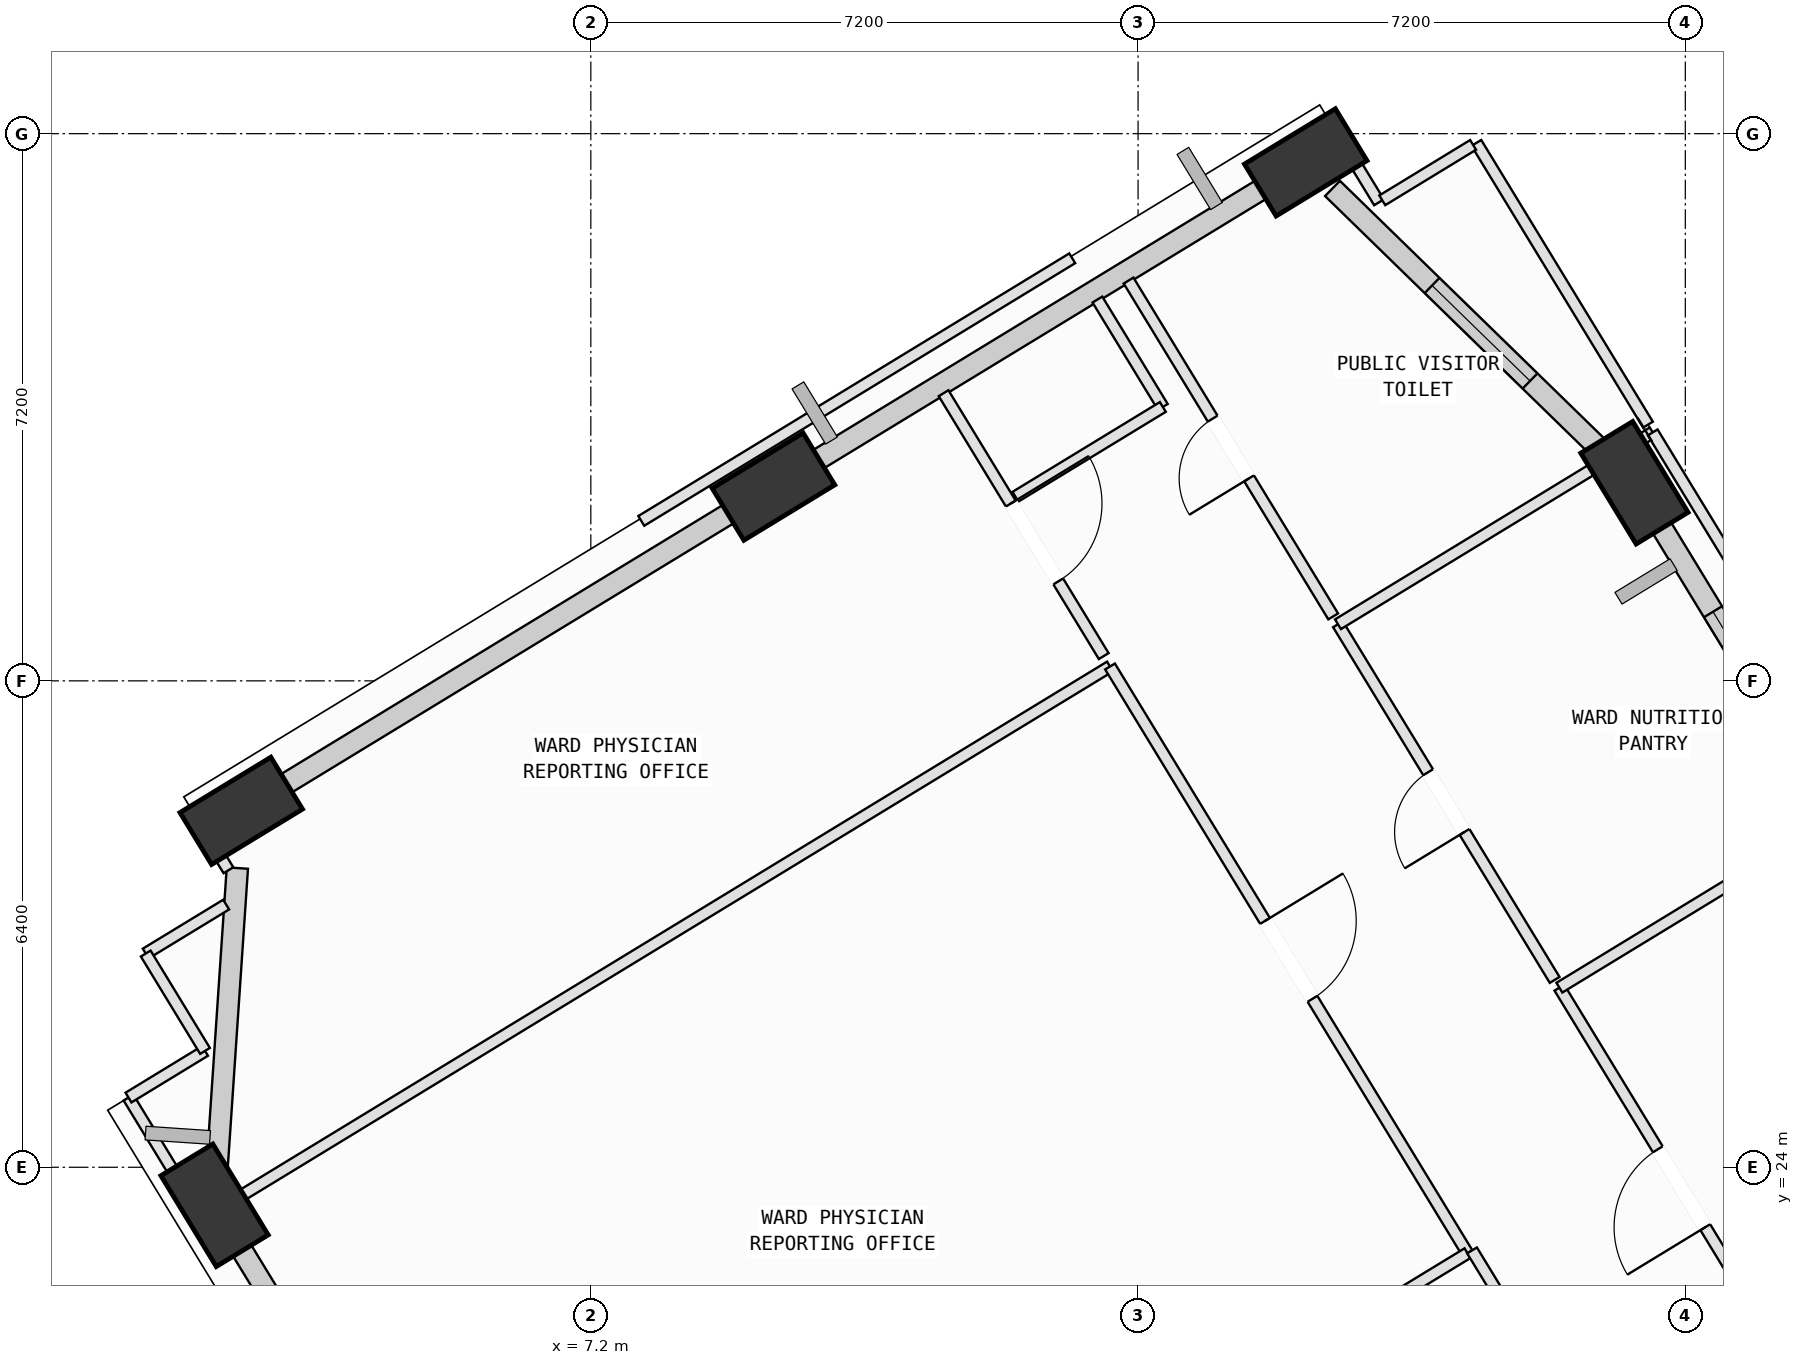
"""IFC4 building model, lengths in metres.
Left out: names, types, materials, properties, quantities, classifications, styles, units other than length and angle.
Written with IfcOpenShell. Run it as: python <this file> out.ifc"""

import sys

from ifc_helpers import new_model, si_unit, direction, frame, frame_2d, origin, origin_2d, place, context, subcontext, project, spatial, rectangle, extrude, element, fill, save


model = new_model("IFC4")
c1 = context("Model", 3, precision=1e-05, world=origin(), true_north=direction((0.0, 1.0)))
c2 = subcontext(c1, "Body", "Model", "MODEL_VIEW")
j1 = project(units=[si_unit("LENGTHUNIT", "METRE"), si_unit("PLANEANGLEUNIT", "RADIAN")], contexts=[c1])
p1 = place(None, origin())
s1 = spatial("IfcSite", under=j1, at=p1, CompositionType="ELEMENT")
p2 = place(p1, origin())
s2 = spatial("IfcBuilding", under=s1, at=p2, CompositionType="ELEMENT")
p3 = place(p2, frame((0.0, 0.0, 157.8)))
s3 = spatial("IfcBuildingStorey", under=s2, at=p3, CompositionType="ELEMENT", Elevation=157.8)
p4 = place(p3, frame((20.931, 33.007, 0.002), z_axis=(-0.033534518386, -0.052679679792, 0.998048239021), x_axis=(0.018821904997, 0.998399508653, 0.053330638599)))
e1 = element("IfcColumn", 1, at=p4, inside=s3, PredefinedType="COLUMN", context=c2, shape_type="SweptSolid", body=[
    extrude(rectangle(XDim=1.4, YDim=0.8, at=origin_2d()), origin(), (0.0, 0.0, 1.0), 4.004),
])
p5 = place(p3, frame((16.606, 37.222, 0.002), z_axis=(-0.050696300595, -0.070597489424, 0.996215779635), x_axis=(0.995994383775, -0.077139317249, 0.045218505326)))
e2 = element("IfcColumn", 2, at=p5, inside=s3, PredefinedType="COLUMN", context=c2, shape_type="SweptSolid", body=[
    extrude(rectangle(XDim=1.4, YDim=0.8, at=origin_2d()), origin(), (0.0, 0.0, 1.0), 4.011),
])
p6 = place(p3, frame((9.603, 32.956, 0.002), z_axis=(-0.032808767098, -0.099155385009, 0.994530941914), x_axis=(0.973312929666, 0.222955959714, 0.054337657051)))
e3 = element("IfcColumn", 3, at=p6, inside=s3, PredefinedType="COLUMN", context=c2, shape_type="SweptSolid", body=[
    extrude(rectangle(XDim=1.4, YDim=0.8, at=origin_2d()), origin(), (0.0, 0.0, 1.0), 4.018),
])
p7 = place(p3, frame((2.6, 28.69, 0.002), z_axis=(-0.014904008756, -0.127532270045, 0.99172243628), x_axis=(0.908122138769, 0.413342067072, 0.066802070824)))
e4 = element("IfcColumn", 4, at=p7, inside=s3, PredefinedType="COLUMN", context=c2, shape_type="SweptSolid", body=[
    extrude(rectangle(XDim=1.4, YDim=0.8, at=origin_2d()), origin(), (0.0, 0.0, 1.0), 4.03),
])
p8 = place(p3, frame((2.25, 23.499, 0.002), z_axis=(0.006421586206, -0.128795210131, 0.991650420803), x_axis=(-0.561790948071, 0.819916255425, 0.110128401217)))
e5 = element("IfcColumn", 5, at=p8, inside=s3, PredefinedType="COLUMN", context=c2, shape_type="SweptSolid", body=[
    extrude(rectangle(XDim=1.4, YDim=0.8, at=origin_2d()), origin(), (0.0, 0.0, 1.0), 4.03),
])
p9 = place(p3, frame((24.448, 27.232, 0.0), z_axis=(0.0, 0.0, 1.0), x_axis=(-0.520230695159, 0.854025774678, 0.0)))
e6 = element("IfcWall", 6, at=p9, inside=s3, PredefinedType="SOLIDWALL", context=c2, shape_type="SweptSolid", body=[
    extrude(rectangle(XDim=6.223, YDim=0.28, at=frame_2d((3.111, 0.0))), origin(), (0.0, 0.0, 1.0), 3.165),
])
p10 = place(p9, frame((3.374, 0.0, 0.75)))
e7 = element("IfcOpeningElement", 7, at=p10, cuts=e6, PredefinedType="OPENING", context=c2, shape_type="SweptSolid", body=[
    extrude(rectangle(XDim=1.4, YDim=1.85, at=frame_2d((0.7, 0.925))), frame((0.0, 0.15, 0.0), z_axis=(0.0, -1.0, 0.0), x_axis=(1.0, 0.0, 0.0)), (0.0, 0.0, 1.0), 0.3),
])
p11 = place(p3, frame((16.958, 36.879, 0.0), z_axis=(0.0, 0.0, 1.0), x_axis=(0.716061838251, -0.698036849888, 0.0)))
e8 = element("IfcWall", 8, at=p11, inside=s3, PredefinedType="SOLIDWALL", context=c2, shape_type="SweptSolid", body=[
    extrude(rectangle(XDim=5.093, YDim=0.28, at=frame_2d((2.546, 0.0))), origin(), (0.0, 0.0, 1.0), 3.165),
])
p12 = place(p11, frame((1.83, 0.0, 0.75)))
e9 = element("IfcOpeningElement", 9, at=p12, cuts=e8, PredefinedType="OPENING", context=c2, shape_type="SweptSolid", body=[
    extrude(rectangle(XDim=1.8, YDim=2.05, at=frame_2d((0.9, 1.025))), frame((0.0, 0.15, 0.0), z_axis=(0.0, -1.0, 0.0), x_axis=(1.0, 0.0, 0.0)), (0.0, 0.0, 1.0), 0.3),
])
p13 = place(p3, frame((9.874, 33.121, 0.0), z_axis=(0.0, 0.0, 1.0), x_axis=(0.854014635071, 0.52024898182, 0.0)))
e10 = element("IfcWall", 10, at=p13, inside=s3, PredefinedType="SOLIDWALL", context=c2, shape_type="SweptSolid", body=[
    extrude(rectangle(XDim=7.231, YDim=0.28, at=frame_2d((3.615, 0.0))), origin(), (0.0, 0.0, 1.0), 3.165),
])
p14 = place(p3, frame((2.851, 28.842, 0.0), z_axis=(0.0, 0.0, 1.0), x_axis=(0.854006543664, 0.520262264036, 0.0)))
e11 = element("IfcWall", 11, at=p14, inside=s3, PredefinedType="SOLIDWALL", context=c2, shape_type="SweptSolid", body=[
    extrude(rectangle(XDim=7.27, YDim=0.28, at=frame_2d((3.635, 0.0))), origin(), (0.0, 0.0, 1.0), 3.165),
])
p15 = place(p3, frame((2.265, 23.736, 0.0), z_axis=(0.0, 0.0, 1.0), x_axis=(0.067492637581, 0.997719772217, 0.0)))
e12 = element("IfcWall", 12, at=p15, inside=s3, PredefinedType="SOLIDWALL", context=c2, shape_type="SweptSolid", body=[
    extrude(rectangle(XDim=4.21, YDim=0.28, at=frame_2d((2.105, 0.0))), origin(), (0.0, 0.0, 1.0), 3.165),
])
p16 = place(p3, frame((5.546, 18.088, 0.0), z_axis=(0.0, 0.0, 1.0), x_axis=(-0.5202703237, 0.85400163365, 0.0)))
e13 = element("IfcWall", 13, at=p16, inside=s3, PredefinedType="SOLIDWALL", context=c2, shape_type="SweptSolid", body=[
    extrude(rectangle(XDim=5.628, YDim=0.28, at=frame_2d((2.814, 0.0))), origin(), (0.0, 0.0, 1.0), 3.165),
])
p17 = place(p16, frame((2.111, 0.0, 0.75)))
e14 = element("IfcOpeningElement", 14, at=p17, cuts=e13, PredefinedType="OPENING", context=c2, shape_type="SweptSolid", body=[
    extrude(rectangle(XDim=1.4, YDim=1.85, at=frame_2d((0.7, 0.925))), frame((0.0, 0.15, 0.0), z_axis=(0.0, -1.0, 0.0), x_axis=(1.0, 0.0, 0.0)), (0.0, 0.0, 1.0), 0.3),
])
p18 = place(p3, frame((2.092, 23.316, 0.0), z_axis=(0.0, 0.0, 1.0), x_axis=(0.854007963695, 0.520259933059, 0.0)))
e15 = element("IfcWall", 15, at=p18, inside=s3, PredefinedType="PARTITIONING", context=c2, shape_type="SweptSolid", body=[
    extrude(rectangle(XDim=13.98, YDim=0.15, at=frame_2d((6.99, 0.0))), origin(), (0.0, 0.0, 1.0), 3.78),
])
p19 = place(p3, frame((14.031, 30.589, 0.0), z_axis=(0.0, 0.0, 1.0), x_axis=(0.520239078164, -0.854020668105, 0.0)))
e16 = element("IfcWall", 16, at=p19, inside=s3, PredefinedType="PARTITIONING", context=c2, shape_type="SweptSolid", body=[
    extrude(rectangle(XDim=9.04, YDim=0.15, at=frame_2d((4.52, 0.0))), origin(), (0.0, 0.0, 1.0), 3.78),
])
p20 = place(p19, frame((3.92, 0.0, 0.0)))
e17 = element("IfcOpeningElement", 17, at=p20, cuts=e16, PredefinedType="OPENING", context=c2, shape_type="SweptSolid", body=[
    extrude(rectangle(XDim=1.2, YDim=2.15, at=frame_2d((0.6, 1.075))), frame((0.0, 0.085, 0.0), z_axis=(0.0, -1.0, 0.0), x_axis=(1.0, 0.0, 0.0)), (0.0, 0.0, 1.0), 0.17),
])
p21 = place(p3, frame((18.734, 22.869, 0.0), z_axis=(0.0, 0.0, 1.0), x_axis=(-0.854021673807, -0.520237427208, 0.0)))
e18 = element("IfcWall", 18, at=p21, inside=s3, PredefinedType="PARTITIONING", context=c2, shape_type="SweptSolid", body=[
    extrude(rectangle(XDim=4.506, YDim=0.15, at=frame_2d((2.253, 0.0))), origin(), (0.0, 0.0, 1.0), 3.78),
])
p22 = place(p3, frame((2.422, 22.774, 0.0), z_axis=(0.0, 0.0, 1.0), x_axis=(-0.520142212164, 0.854079667903, 0.0)))
e19 = element("IfcWall", 19, at=p22, inside=s3, PredefinedType="PARTITIONING", context=c2, shape_type="SweptSolid", body=[
    extrude(rectangle(XDim=0.635, YDim=0.15, at=frame_2d((0.317, 0.0))), origin(), (0.0, 0.0, 1.0), 3.165),
])
p23 = place(p3, frame((1.344, 26.812, 0.0), z_axis=(0.0, 0.0, 1.0), x_axis=(0.854206167436, 0.519934441554, 0.0)))
e20 = element("IfcWall", 20, at=p23, inside=s3, PredefinedType="PARTITIONING", context=c2, shape_type="SweptSolid", body=[
    extrude(rectangle(XDim=1.239, YDim=0.15, at=frame_2d((0.619, 0.0))), origin(), (0.0, 0.0, 1.0), 3.78),
])
p24 = place(p3, frame((2.432, 27.908, 0.0), z_axis=(0.0, 0.0, 1.0), x_axis=(-0.519606283124, 0.854405823095, 0.0)))
e21 = element("IfcWall", 21, at=p24, inside=s3, PredefinedType="PARTITIONING", context=c2, shape_type="SweptSolid", body=[
    extrude(rectangle(XDim=0.75, YDim=0.15, at=frame_2d((0.375, 0.0))), origin(), (0.0, 0.0, 1.0), 3.065),
])
p25 = place(p3, frame((2.042, 28.549, 0.0), z_axis=(0.0, 0.0, 1.0), x_axis=(0.853818147022, 0.520571389741, 0.0)))
e22 = element("IfcWall", 22, at=p25, inside=s3, PredefinedType="PARTITIONING", context=c2, shape_type="SweptSolid", body=[
    extrude(rectangle(XDim=0.843, YDim=0.15, at=frame_2d((0.422, 0.0))), origin(), (0.0, 0.0, 1.0), 3.78),
])
p26 = place(p3, frame((8.971, 32.77, 0.0), z_axis=(0.0, 0.0, 1.0), x_axis=(0.854178789285, 0.519979418762, 0.0)))
e23 = element("IfcWall", 23, at=p26, inside=s3, PredefinedType="PARTITIONING", context=c2, shape_type="SweptSolid", body=[
    extrude(rectangle(XDim=0.954, YDim=0.15, at=frame_2d((0.477, 0.0))), origin(), (0.0, 0.0, 1.0), 3.78),
])
p27 = place(p3, frame((11.841, 34.185, 0.0), z_axis=(0.0, 0.0, 1.0), x_axis=(0.520210820935, -0.854037880765, 0.0)))
e24 = element("IfcWall", 24, at=p27, inside=s3, PredefinedType="PARTITIONING", context=c2, shape_type="SweptSolid", body=[
    extrude(rectangle(XDim=4.05, YDim=0.15, at=frame_2d((2.025, 0.0))), origin(), (0.0, 0.0, 1.0), 3.78),
])
p28 = place(p27, frame((1.7, 0.0, 0.0)))
e25 = element("IfcOpeningElement", 25, at=p28, cuts=e24, PredefinedType="OPENING", context=c2, shape_type="SweptSolid", body=[
    extrude(rectangle(XDim=1.2, YDim=2.15, at=frame_2d((0.6, 1.075))), frame((0.0, 0.085, 0.0), z_axis=(0.0, -1.0, 0.0), x_axis=(1.0, 0.0, 0.0)), (0.0, 0.0, 1.0), 0.17),
])
p29 = place(p3, frame((2.009, 23.453, 0.0), z_axis=(0.0, 0.0, 1.0), x_axis=(-0.520326364679, 0.853967490142, 0.0)))
e26 = element("IfcWall", 26, at=p29, inside=s3, PredefinedType="PARTITIONING", context=c2, shape_type="SweptSolid", body=[
    extrude(rectangle(XDim=1.715, YDim=0.15, at=frame_2d((0.857, 0.0))), origin(), (0.0, 0.0, 1.0), 3.78),
])
p30 = place(p3, frame((1.117, 24.917, 0.0), z_axis=(0.0, 0.0, 1.0), x_axis=(0.853818614976, 0.520570622222, 0.0)))
e27 = element("IfcWall", 27, at=p30, inside=s3, PredefinedType="PARTITIONING", context=c2, shape_type="SweptSolid", body=[
    extrude(rectangle(XDim=1.179, YDim=0.15, at=frame_2d((0.59, 0.0))), origin(), (0.0, 0.0, 1.0), 3.78),
])
p31 = place(p3, frame((2.124, 25.531, 0.0), z_axis=(0.0, 0.0, 1.0), x_axis=(-0.520086370604, 0.854113673414, 0.0)))
e28 = element("IfcWall", 28, at=p31, inside=s3, PredefinedType="PARTITIONING", context=c2, shape_type="SweptSolid", body=[
    extrude(rectangle(XDim=1.5, YDim=0.15, at=frame_2d((0.75, 0.0))), origin(), (0.0, 0.0, 1.0), 3.78),
])
p32 = place(p3, frame((23.158, 21.085, 0.0), z_axis=(0.0, 0.0, 1.0), x_axis=(-0.520195067616, 0.854047476214, 0.0)))
e29 = element("IfcWall", 29, at=p32, inside=s3, PredefinedType="PARTITIONING", context=c2, shape_type="SweptSolid", body=[
    extrude(rectangle(XDim=6.18, YDim=0.15, at=frame_2d((3.09, 0.0))), origin(), (0.0, 0.0, 1.0), 3.78),
])
p33 = place(p32, frame((2.49, 0.0, 0.0)))
e30 = element("IfcOpeningElement", 30, at=p33, cuts=e29, PredefinedType="OPENING", context=c2, shape_type="SweptSolid", body=[
    extrude(rectangle(XDim=1.2, YDim=2.15, at=frame_2d((0.6, 1.075))), frame((0.0, 0.085, 0.0), z_axis=(0.0, -1.0, 0.0), x_axis=(1.0, 0.0, 0.0)), (0.0, 0.0, 1.0), 0.17),
])
p34 = place(p3, frame((19.943, 26.363, 0.0), z_axis=(0.0, 0.0, 1.0), x_axis=(0.854035162243, 0.520215283948, 0.0)))
e31 = element("IfcWall", 31, at=p34, inside=s3, PredefinedType="PARTITIONING", context=c2, shape_type="SweptSolid", body=[
    extrude(rectangle(XDim=4.185, YDim=0.15, at=frame_2d((2.092, 0.0))), origin(), (0.0, 0.0, 1.0), 3.78),
])
p35 = place(p3, frame((19.881, 26.465, 0.0), z_axis=(0.0, 0.0, 1.0), x_axis=(-0.520269153485, 0.854002346561, 0.0)))
e32 = element("IfcWall", 32, at=p35, inside=s3, PredefinedType="PARTITIONING", context=c2, shape_type="SweptSolid", body=[
    extrude(rectangle(XDim=5.48, YDim=0.15, at=frame_2d((2.74, 0.0))), origin(), (0.0, 0.0, 1.0), 3.78),
])
p36 = place(p35, frame((2.28, 0.0, 0.0)))
e33 = element("IfcOpeningElement", 33, at=p36, cuts=e32, PredefinedType="OPENING", context=c2, shape_type="SweptSolid", body=[
    extrude(rectangle(XDim=0.92, YDim=2.1, at=frame_2d((0.46, 1.05))), frame((0.0, 0.085, 0.0), z_axis=(0.0, -1.0, 0.0), x_axis=(1.0, 0.0, 0.0)), (0.0, 0.0, 1.0), 0.17),
])
p37 = place(p3, frame((17.03, 31.145, 0.0), z_axis=(0.0, 0.0, 1.0), x_axis=(0.853935379197, 0.520379061988, 0.0)))
e34 = element("IfcWall", 34, at=p37, inside=s3, PredefinedType="PARTITIONING", context=c2, shape_type="SweptSolid", body=[
    extrude(rectangle(XDim=4.068, YDim=0.15, at=frame_2d((2.034, 0.0))), origin(), (0.0, 0.0, 1.0), 3.78),
])
p38 = place(p3, frame((20.703, 33.384, 0.0), z_axis=(0.0, 0.0, 1.0), x_axis=(0.854172741776, 0.519989352975, 0.0)))
e35 = element("IfcWall", 35, at=p38, inside=s3, PredefinedType="PARTITIONING", context=c2, shape_type="SweptSolid", body=[
    extrude(rectangle(XDim=0.548, YDim=0.15, at=frame_2d((0.274, 0.0))), origin(), (0.0, 0.0, 1.0), 3.78),
])
p39 = place(p3, frame((21.171, 33.669, 0.0), z_axis=(0.0, 0.0, 1.0), x_axis=(0.520399103796, -0.853923165611, 0.0)))
e36 = element("IfcWall", 36, at=p39, inside=s3, PredefinedType="PARTITIONING", context=c2, shape_type="SweptSolid", body=[
    extrude(rectangle(XDim=5.48, YDim=0.15, at=frame_2d((2.74, 0.0))), origin(), (0.0, 0.0, 1.0), 3.78),
])
p40 = place(p3, frame((18.851, 37.478, 0.0), z_axis=(0.0, 0.0, 1.0), x_axis=(0.52017533127, -0.854059497189, 0.0)))
e37 = element("IfcWall", 37, at=p40, inside=s3, PredefinedType="PARTITIONING", context=c2, shape_type="SweptSolid", body=[
    extrude(rectangle(XDim=4.341, YDim=0.15, at=frame_2d((2.17, 0.0))), origin(), (0.0, 0.0, 1.0), 3.78),
])
p41 = place(p3, frame((16.967, 31.248, 0.0), z_axis=(0.0, 0.0, 1.0), x_axis=(-0.520277703675, 0.853997137618, 0.0)))
e38 = element("IfcWall", 38, at=p41, inside=s3, PredefinedType="PARTITIONING", context=c2, shape_type="SweptSolid", body=[
    extrude(rectangle(XDim=5.174, YDim=0.15, at=frame_2d((2.587, 0.0))), origin(), (0.0, 0.0, 1.0), 3.78),
])
p42 = place(p41, frame((2.127, 0.0, 0.0)))
e39 = element("IfcOpeningElement", 39, at=p42, cuts=e38, PredefinedType="OPENING", context=c2, shape_type="SweptSolid", body=[
    extrude(rectangle(XDim=0.92, YDim=2.1, at=frame_2d((0.46, 1.05))), frame((0.0, 0.085, 0.0), z_axis=(0.0, -1.0, 0.0), x_axis=(1.0, 0.0, 0.0)), (0.0, 0.0, 1.0), 0.17),
])
p43 = place(p3, frame((15.95, 37.045, 0.0), z_axis=(0.0, 0.0, 1.0), x_axis=(0.853908380965, 0.520423363155, 0.0)))
e40 = element("IfcWall", 40, at=p43, inside=s3, PredefinedType="PARTITIONING", context=c2, shape_type="SweptSolid", body=[
    extrude(rectangle(XDim=1.203, YDim=0.15, at=frame_2d((0.602, 0.0))), origin(), (0.0, 0.0, 1.0), 3.165),
])
p44 = place(p3, frame((17.003, 37.628, 0.0), z_axis=(0.0, 0.0, 1.0), x_axis=(0.52028085322, -0.853995218823, 0.0)))
e41 = element("IfcWall", 41, at=p44, inside=s3, PredefinedType="PARTITIONING", context=c2, shape_type="SweptSolid", body=[
    extrude(rectangle(XDim=1.09, YDim=0.15, at=frame_2d((0.545, 0.0))), origin(), (0.0, 0.0, 1.0), 3.78),
])
p45 = place(p3, frame((17.613, 36.723, 0.0), z_axis=(0.0, 0.0, 1.0), x_axis=(0.85369973311, 0.520765557317, 0.0)))
e42 = element("IfcWall", 42, at=p45, inside=s3, PredefinedType="PARTITIONING", context=c2, shape_type="SweptSolid", body=[
    extrude(rectangle(XDim=1.4, YDim=0.15, at=frame_2d((0.7, 0.0))), origin(), (0.0, 0.0, 1.0), 3.78),
])
p46 = place(p3, frame((7.864, 32.505, 0.0), z_axis=(0.0, 0.0, 1.0), x_axis=(0.853942838584, 0.520366821032, 0.0)))
e43 = element("IfcWall", 43, at=p46, inside=s3, PredefinedType="PARTITIONING", context=c2, shape_type="SweptSolid", body=[
    extrude(rectangle(XDim=6.64, YDim=0.15, at=frame_2d((3.32, 0.0))), origin(), (0.0, 0.0, 1.0), 3.78),
])
p47 = place(p3, frame((13.865, 35.417, 0.0), z_axis=(0.0, 0.0, 1.0), x_axis=(0.520363448518, -0.853944893683, 0.0)))
e44 = element("IfcWall", 44, at=p47, inside=s3, PredefinedType="PARTITIONING", context=c2, shape_type="SweptSolid", body=[
    extrude(rectangle(XDim=1.655, YDim=0.15, at=frame_2d((0.827, 0.0))), origin(), (0.0, 0.0, 1.0), 3.78),
])
p48 = place(p3, frame((14.726, 34.004, 0.0), z_axis=(0.0, 0.0, 1.0), x_axis=(-0.854067702897, -0.520161858337, 0.0)))
e45 = element("IfcWall", 45, at=p48, inside=s3, PredefinedType="PARTITIONING", context=c2, shape_type="SweptSolid", body=[
    extrude(rectangle(XDim=2.27, YDim=0.15, at=frame_2d((1.135, 0.0))), origin(), (0.0, 0.0, 1.0), 3.78),
])
p49 = place(p3, frame((18.794, 22.906, 0.0), z_axis=(0.0, 0.0, 1.0), x_axis=(0.520271097481, -0.854001162251, 0.0)))
e46 = element("IfcWall", 46, at=p49, inside=s3, PredefinedType="PARTITIONING", context=c2, shape_type="SweptSolid", body=[
    extrude(rectangle(XDim=2.724, YDim=0.15, at=frame_2d((1.362, 0.0))), origin(), (0.0, 0.0, 1.0), 3.78),
])
p50 = place(p10, origin())
e47 = element("IfcWindow", 47, at=p50, inside=s3, PartitioningType="SINGLE_PANEL", PredefinedType="WINDOW", context=c2, shape_type="SweptSolid", body=[
    extrude(rectangle(XDim=1.4, YDim=1.85, at=frame_2d((0.7, 0.925))), frame((0.0, 0.03, 0.0), z_axis=(0.0, -1.0, 0.0), x_axis=(1.0, 0.0, 0.0)), (0.0, 0.0, 1.0), 0.06),
])
fill(e7, e47)
p51 = place(p12, origin())
e48 = element("IfcWindow", 48, at=p51, inside=s3, PartitioningType="SINGLE_PANEL", PredefinedType="WINDOW", context=c2, shape_type="SweptSolid", body=[
    extrude(rectangle(XDim=1.8, YDim=2.05, at=frame_2d((0.9, 1.025))), frame((0.0, 0.03, 0.0), z_axis=(0.0, -1.0, 0.0), x_axis=(1.0, 0.0, 0.0)), (0.0, 0.0, 1.0), 0.06),
])
fill(e9, e48)
p52 = place(p20, origin())
e49 = element("IfcDoor", 49, at=p52, inside=s3, OperationType="SINGLE_SWING_LEFT", PredefinedType="DOOR", context=c2, shape_type="SweptSolid", body=[
    extrude(rectangle(XDim=1.2, YDim=2.15, at=frame_2d((0.6, 1.075))), frame((0.0, 0.025, 0.0), z_axis=(0.0, -1.0, 0.0), x_axis=(1.0, 0.0, 0.0)), (0.0, 0.0, 1.0), 0.05),
])
fill(e17, e49)
p53 = place(p28, origin())
e50 = element("IfcDoor", 50, at=p53, inside=s3, OperationType="SINGLE_SWING_LEFT", PredefinedType="DOOR", context=c2, shape_type="SweptSolid", body=[
    extrude(rectangle(XDim=1.2, YDim=2.15, at=frame_2d((0.6, 1.075))), frame((0.0, 0.025, 0.0), z_axis=(0.0, -1.0, 0.0), x_axis=(1.0, 0.0, 0.0)), (0.0, 0.0, 1.0), 0.05),
])
fill(e25, e50)
p54 = place(p33, origin())
e51 = element("IfcDoor", 51, at=p54, inside=s3, OperationType="SINGLE_SWING_LEFT", PredefinedType="DOOR", context=c2, shape_type="SweptSolid", body=[
    extrude(rectangle(XDim=1.2, YDim=2.15, at=frame_2d((0.6, 1.075))), frame((0.0, 0.025, 0.0), z_axis=(0.0, -1.0, 0.0), x_axis=(1.0, 0.0, 0.0)), (0.0, 0.0, 1.0), 0.05),
])
fill(e30, e51)
p55 = place(p36, origin())
e52 = element("IfcDoor", 52, at=p55, inside=s3, OperationType="SINGLE_SWING_LEFT", PredefinedType="DOOR", context=c2, shape_type="SweptSolid", body=[
    extrude(rectangle(XDim=0.92, YDim=2.1, at=frame_2d((0.46, 1.05))), frame((0.0, 0.025, 0.0), z_axis=(0.0, -1.0, 0.0), x_axis=(1.0, 0.0, 0.0)), (0.0, 0.0, 1.0), 0.05),
])
fill(e33, e52)
p56 = place(p42, origin())
e53 = element("IfcDoor", 53, at=p56, inside=s3, OperationType="SINGLE_SWING_LEFT", PredefinedType="DOOR", context=c2, shape_type="SweptSolid", body=[
    extrude(rectangle(XDim=0.92, YDim=2.1, at=frame_2d((0.46, 1.05))), frame((0.0, 0.025, 0.0), z_axis=(0.0, -1.0, 0.0), x_axis=(1.0, 0.0, 0.0)), (0.0, 0.0, 1.0), 0.05),
])
fill(e39, e53)
save(model, sys.argv[1])
